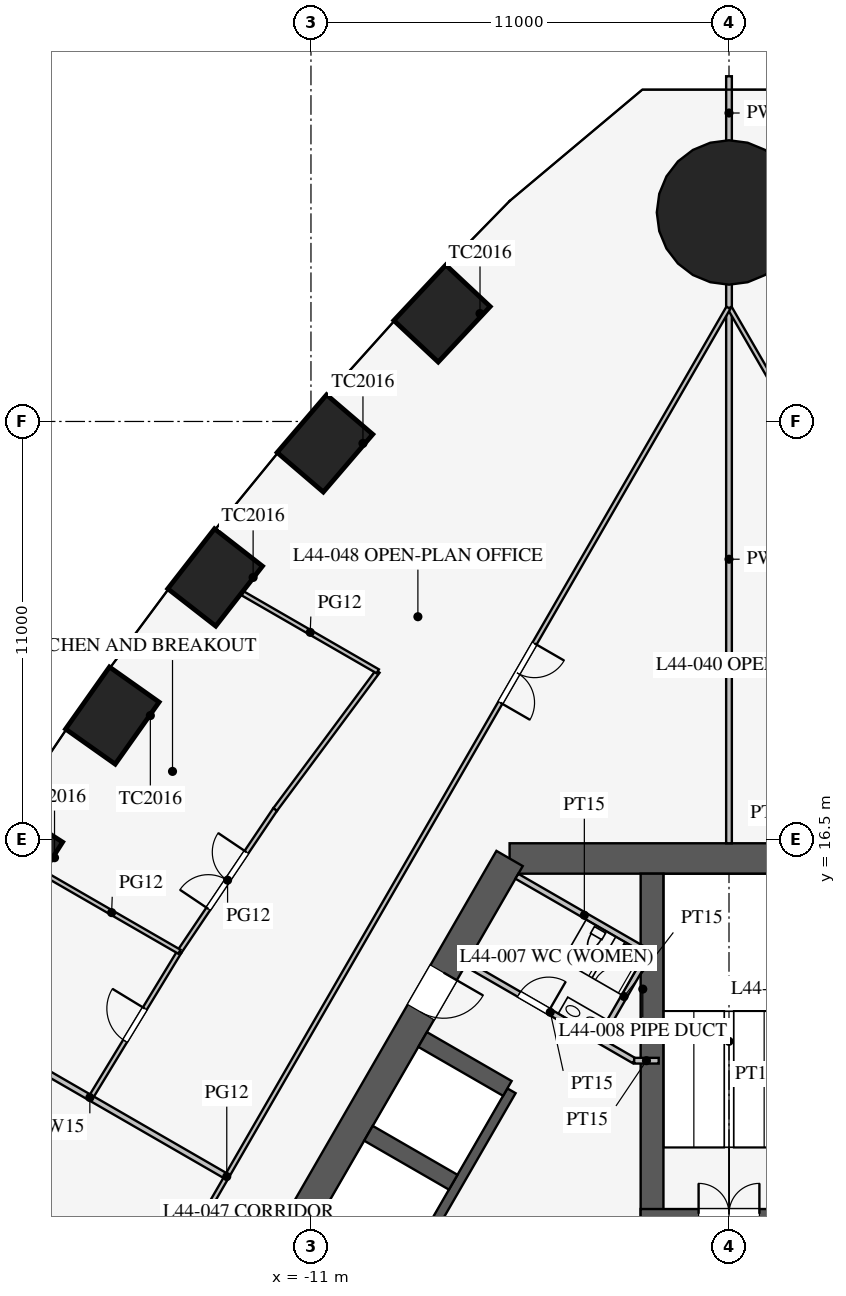
"""IFC4 building model, lengths in metres.
Left out: names, types, materials, properties, quantities, classifications, styles, units other than length and angle.
Written with IfcOpenShell. Run it as: python <this file> out.ifc"""

import sys

from ifc_helpers import new_model, si_unit, direction, frame, frame_2d, origin, origin_2d, place, context, subcontext, project, spatial, rectangle, circle, extrude, element, fill, save


model = new_model("IFC4")
c1 = context("Model", 3, precision=1e-05, world=origin(), true_north=direction((0.0, 1.0)))
c2 = subcontext(c1, "Body", "Model", "MODEL_VIEW")
j1 = project(units=[si_unit("LENGTHUNIT", "METRE"), si_unit("PLANEANGLEUNIT", "RADIAN")], contexts=[c1])
p1 = place(None, origin())
s1 = spatial("IfcSite", under=j1, at=p1, CompositionType="ELEMENT")
p2 = place(p1, origin())
s2 = spatial("IfcBuilding", under=s1, at=p2, CompositionType="ELEMENT")
p3 = place(p2, frame((0.0, 0.0, 193.9)))
s3 = spatial("IfcBuildingStorey", under=s2, at=p3, CompositionType="ELEMENT", Elevation=193.9)
for number, where, z_axis, x_axis in (
    (1, (-7.552, 30.341, 0.0), (0.0, 0.0, 1.0), (-0.684, -0.73, 0.0)),
    (2, (-10.632, 26.923, 0.0), (0.0, 0.0, 1.0), (-0.651, -0.759, 0.0)),
    (3, (-13.522, 23.396, 0.0), (0.0, 0.0, 1.0), (-0.615, -0.789, 0.0)),
    (4, (-16.227, 19.761, 0.0), (0.0, 0.0, 1.0), (-0.577, -0.816, 0.0)),
    (5, (-18.748, 16.02, 0.0), (0.0, 0.0, 1.0), (-0.539, -0.842, 0.0)),
):
    element("IfcColumn", number, at=place(p3, frame(where, z_axis=z_axis, x_axis=x_axis)), inside=s3, PredefinedType="COLUMN", context=c2, shape_type="SweptSolid", body=[
        extrude(rectangle(XDim=2.0, YDim=1.6, at=origin_2d()), origin(), (0.0, 0.0, 1.0), 4.2),
    ])
p4 = place(p3, frame((0.0, 33.0, 0.0), z_axis=(0.0, 0.0, 1.0), x_axis=(1.0, 0.0, 0.0)))
e6 = element("IfcColumn", 6, at=p4, inside=s3, PredefinedType="COLUMN", context=c2, shape_type="SweptSolid", body=[
    extrude(circle(Radius=1.9, at=origin_2d()), origin(), (0.0, 0.0, 1.0), 4.2),
])
p5 = place(p3, frame((5.773, 16.0, 0.0), z_axis=(0.0, 0.0, 1.0), x_axis=(-1.0, 0.0, 0.0)))
e7 = element("IfcWall", 7, at=p5, inside=s3, PredefinedType="SHEAR", context=c2, shape_type="SweptSolid", body=[
    extrude(rectangle(XDim=11.547, YDim=0.8, at=frame_2d((5.773, 0.0))), origin(), (0.0, 0.0, 1.0), 4.2),
])
p6 = place(p3, frame((-5.773, 16.0, 0.0), z_axis=(0.0, 0.0, 1.0), x_axis=(-0.500002442456, -0.866023993627, 0.0)))
e8 = element("IfcWall", 8, at=p6, inside=s3, PredefinedType="SHEAR", context=c2, shape_type="SweptSolid", body=[
    extrude(rectangle(XDim=21.939, YDim=0.8, at=frame_2d((10.97, 0.0))), origin(), (0.0, 0.0, 1.0), 4.2),
])
p7 = place(p6, frame((17.27, 0.0, 0.0)))
e9 = element("IfcOpeningElement", 9, at=p7, cuts=e8, PredefinedType="OPENING", context=c2, shape_type="SweptSolid", body=[
    extrude(rectangle(XDim=1.2, YDim=2.1, at=frame_2d((0.6, 1.05))), frame((0.0, 0.41, 0.0), z_axis=(0.0, -1.0, 0.0), x_axis=(1.0, 0.0, 0.0)), (0.0, 0.0, 1.0), 0.82),
])
p8 = place(p6, frame((3.47, 0.0, 0.0)))
e10 = element("IfcOpeningElement", 10, at=p8, cuts=e8, PredefinedType="OPENING", context=c2, shape_type="SweptSolid", body=[
    extrude(rectangle(XDim=1.2, YDim=2.1, at=frame_2d((0.6, 1.05))), frame((0.0, 0.41, 0.0), z_axis=(0.0, -1.0, 0.0), x_axis=(1.0, 0.0, 0.0)), (0.0, 0.0, 1.0), 0.82),
])
p9 = place(p3, frame((-5.724, 9.886, 0.0), z_axis=(0.0, 0.0, 1.0), x_axis=(-0.500001763848, -0.866024385424, 0.0)))
e11 = element("IfcWall", 11, at=p9, inside=s3, PredefinedType="SHEAR", context=c2, shape_type="SweptSolid", body=[
    extrude(rectangle(XDim=11.4, YDim=0.25, at=frame_2d((5.7, 0.0))), origin(), (0.0, 0.0, 1.0), 4.2),
])
p10 = place(p9, frame((6.525, 0.0, 0.0)))
e12 = element("IfcOpeningElement", 12, at=p10, cuts=e11, PredefinedType="OPENING", context=c2, shape_type="SweptSolid", body=[
    extrude(rectangle(XDim=1.2, YDim=2.2, at=frame_2d((0.6, 1.1))), frame((0.0, 0.135, 0.0), z_axis=(0.0, -1.0, 0.0), x_axis=(1.0, 0.0, 0.0)), (0.0, 0.0, 1.0), 0.27),
])
p11 = place(p9, frame((9.375, 0.0, 0.0)))
e13 = element("IfcOpeningElement", 13, at=p11, cuts=e11, PredefinedType="OPENING", context=c2, shape_type="SweptSolid", body=[
    extrude(rectangle(XDim=1.2, YDim=2.2, at=frame_2d((0.6, 1.1))), frame((0.0, 0.135, 0.0), z_axis=(0.0, -1.0, 0.0), x_axis=(1.0, 0.0, 0.0)), (0.0, 0.0, 1.0), 0.27),
])
p12 = place(p3, frame((-5.832, 9.949, 0.0), z_axis=(0.0, 0.0, 1.0), x_axis=(-0.866029291668, 0.499993265928, 0.0)))
e14 = element("IfcWall", 14, at=p12, inside=s3, PredefinedType="SHEAR", context=c2, shape_type="SweptSolid", body=[
    extrude(rectangle(XDim=2.575, YDim=0.45, at=frame_2d((1.288, 0.0))), origin(), (0.0, 0.0, 1.0), 4.2),
])
p13 = place(p3, frame((-7.257, 7.481, 0.0), z_axis=(0.0, 0.0, 1.0), x_axis=(-0.866046643894, 0.499963209246, 0.0)))
e15 = element("IfcWall", 15, at=p13, inside=s3, PredefinedType="SHEAR", context=c2, shape_type="SweptSolid", body=[
    extrude(rectangle(XDim=2.575, YDim=0.45, at=frame_2d((1.288, 0.0))), origin(), (0.0, 0.0, 1.0), 4.2),
])
p14 = place(p3, frame((-2.025, 6.525, 0.0), z_axis=(0.0, 0.0, 1.0), x_axis=(0.0, 1.0, 0.0)))
e16 = element("IfcWall", 16, at=p14, inside=s3, PredefinedType="SHEAR", context=c2, shape_type="SweptSolid", body=[
    extrude(rectangle(XDim=9.075, YDim=0.6, at=frame_2d((4.538, 0.0))), origin(), (0.0, 0.0, 1.0), 4.2),
])
p15 = place(p3, frame((2.325, 6.65, 0.0), z_axis=(0.0, 0.0, 1.0), x_axis=(-1.0, 0.0, 0.0)))
e17 = element("IfcWall", 17, at=p15, inside=s3, PredefinedType="SHEAR", context=c2, shape_type="SweptSolid", body=[
    extrude(rectangle(XDim=4.65, YDim=0.25, at=frame_2d((2.325, 0.0))), origin(), (0.0, 0.0, 1.0), 4.2),
])
p16 = place(p15, frame((1.525, 0.0, 0.0)))
e18 = element("IfcOpeningElement", 18, at=p16, cuts=e17, PredefinedType="OPENING", context=c2, shape_type="SweptSolid", body=[
    extrude(rectangle(XDim=1.6, YDim=2.1, at=frame_2d((0.8, 1.05))), frame((0.0, 0.135, 0.0), z_axis=(0.0, -1.0, 0.0), x_axis=(1.0, 0.0, 0.0)), (0.0, 0.0, 1.0), 0.27),
])
p17 = place(p3, frame((-2.495, 10.678, 0.0), z_axis=(0.0, 0.0, 1.0), x_axis=(-0.86602216432, 0.500005610874, 0.0)))
e19 = element("IfcWall", 19, at=p17, inside=s3, PredefinedType="PARTITIONING", context=c2, shape_type="SweptSolid", body=[
    extrude(rectangle(XDim=5.1, YDim=0.15, at=frame_2d((2.55, 0.0))), origin(), (0.0, 0.0, 1.0), 4.0),
])
p18 = place(p17, frame((2.6, 0.0, 0.0)))
e20 = element("IfcOpeningElement", 20, at=p18, cuts=e19, PredefinedType="OPENING", context=c2, shape_type="SweptSolid", body=[
    extrude(rectangle(XDim=0.9, YDim=2.1, at=frame_2d((0.45, 1.05))), frame((0.0, 0.085, 0.0), z_axis=(0.0, -1.0, 0.0), x_axis=(1.0, 0.0, 0.0)), (0.0, 0.0, 1.0), 0.17),
])
p19 = place(p3, frame((-2.495, 10.678, 0.0), z_axis=(0.0, 0.0, 1.0), x_axis=(1.0, 0.0, 0.0)))
e21 = element("IfcWall", 21, at=p19, inside=s3, PredefinedType="PARTITIONING", context=c2, shape_type="SweptSolid", body=[
    extrude(rectangle(XDim=0.645, YDim=0.15, at=frame_2d((0.323, 0.0))), origin(), (0.0, 0.0, 1.0), 4.0),
])
p20 = place(p3, frame((-2.031, 13.482, 0.0), z_axis=(0.0, 0.0, 1.0), x_axis=(-0.866050731258, 0.499956128963, 0.0)))
e22 = element("IfcWall", 22, at=p20, inside=s3, PredefinedType="PARTITIONING", context=c2, shape_type="SweptSolid", body=[
    extrude(rectangle(XDim=4.1, YDim=0.15, at=frame_2d((2.05, 0.0))), origin(), (0.0, 0.0, 1.0), 4.0),
])
p21 = place(p3, frame((-3.389, 11.281, 0.0), z_axis=(0.0, 0.0, 1.0), x_axis=(0.499989096993, 0.866031698547, 0.0)))
e23 = element("IfcWall", 23, at=p21, inside=s3, PredefinedType="PARTITIONING", context=c2, shape_type="SweptSolid", body=[
    extrude(rectangle(XDim=2.51, YDim=0.15, at=frame_2d((1.255, 0.0))), origin(), (0.0, 0.0, 1.0), 4.0),
])
p22 = place(p3, frame((0.0, 16.4, 0.0), z_axis=(0.0, 0.0, 1.0), x_axis=(0.0, 1.0, 0.0)))
e24 = element("IfcWall", 24, at=p22, inside=s3, PredefinedType="PARTITIONING", context=c2, shape_type="SweptSolid", body=[
    extrude(rectangle(XDim=14.95, YDim=0.15, at=frame_2d((7.475, 0.0))), origin(), (0.0, 0.0, 1.0), 2.4),
])
p23 = place(p3, frame((0.0, 34.65, 0.0), z_axis=(0.0, 0.0, 1.0), x_axis=(0.0, 1.0, 0.0)))
e25 = element("IfcWall", 25, at=p23, inside=s3, PredefinedType="PARTITIONING", context=c2, shape_type="SweptSolid", body=[
    extrude(rectangle(XDim=1.935, YDim=0.15, at=frame_2d((0.967, 0.0))), origin(), (0.0, 0.0, 1.0), 2.4),
])
p24 = place(p3, frame((26.415, -15.231, 0.0), z_axis=(0.0, 0.0, 1.0), x_axis=(-0.50000091641, 0.866024874695, 0.0)))
e26 = element("IfcWall", 26, at=p24, inside=s3, PredefinedType="PARTITIONING", context=c2, shape_type="SweptSolid", body=[
    extrude(rectangle(XDim=52.796, YDim=0.12, at=frame_2d((26.398, 0.0))), origin(), (0.0, 0.0, 1.0), 2.9),
])
p25 = place(p24, frame((10.2, 0.0, 0.15)))
e27 = element("IfcOpeningElement", 27, at=p25, cuts=e26, PredefinedType="OPENING", context=c2, shape_type="SweptSolid", body=[
    extrude(rectangle(XDim=1.8, YDim=2.1, at=frame_2d((0.9, 1.05))), frame((0.0, 0.07, 0.0), z_axis=(0.0, -1.0, 0.0), x_axis=(1.0, 0.0, 0.0)), (0.0, 0.0, 1.0), 0.14),
])
p26 = place(p24, frame((40.8, 0.0, 0.15)))
e28 = element("IfcOpeningElement", 28, at=p26, cuts=e26, PredefinedType="OPENING", context=c2, shape_type="SweptSolid", body=[
    extrude(rectangle(XDim=1.8, YDim=2.1, at=frame_2d((0.9, 1.05))), frame((0.0, 0.07, 0.0), z_axis=(0.0, -1.0, 0.0), x_axis=(1.0, 0.0, 0.0)), (0.0, 0.0, 1.0), 0.14),
])
p27 = place(p3, frame((-13.268, 7.66, 0.0), z_axis=(0.0, 0.0, 1.0), x_axis=(-0.866019499219, 0.500010226868, 0.0)))
e29 = element("IfcWall", 29, at=p27, inside=s3, PredefinedType="PARTITIONING", context=c2, shape_type="SweptSolid", body=[
    extrude(rectangle(XDim=8.2, YDim=0.15, at=frame_2d((4.1, 0.0))), origin(), (0.0, 0.0, 1.0), 2.992),
])
p28 = place(p3, frame((-0.016, 30.491, 0.0), z_axis=(0.0, 0.0, 1.0), x_axis=(-0.50000091641, -0.866024874695, 0.0)))
e30 = element("IfcWall", 30, at=p28, inside=s3, PredefinedType="PARTITIONING", context=c2, shape_type="SweptSolid", body=[
    extrude(rectangle(XDim=52.796, YDim=0.12, at=frame_2d((26.398, 0.0))), origin(), (0.0, 0.0, 1.0), 2.9),
])
p29 = place(p28, frame((10.2, 0.0, 0.15)))
e31 = element("IfcOpeningElement", 31, at=p29, cuts=e30, PredefinedType="OPENING", context=c2, shape_type="SweptSolid", body=[
    extrude(rectangle(XDim=1.8, YDim=2.1, at=frame_2d((0.9, 1.05))), frame((0.0, 0.07, 0.0), z_axis=(0.0, -1.0, 0.0), x_axis=(1.0, 0.0, 0.0)), (0.0, 0.0, 1.0), 0.14),
])
p30 = place(p28, frame((40.8, 0.0, 0.15)))
e32 = element("IfcOpeningElement", 32, at=p30, cuts=e30, PredefinedType="OPENING", context=c2, shape_type="SweptSolid", body=[
    extrude(rectangle(XDim=1.8, YDim=2.1, at=frame_2d((0.9, 1.05))), frame((0.0, 0.07, 0.0), z_axis=(0.0, -1.0, 0.0), x_axis=(1.0, 0.0, 0.0)), (0.0, 0.0, 1.0), 0.14),
])
p31 = place(p3, frame((-9.242, 20.924, 0.0), z_axis=(0.0, 0.0, 1.0), x_axis=(-0.59613842716, -0.802881669777, 0.0)))
e33 = element("IfcWall", 33, at=p31, inside=s3, PredefinedType="PARTITIONING", context=c2, shape_type="SweptSolid", body=[
    extrude(rectangle(XDim=4.53, YDim=0.12, at=frame_2d((2.265, 0.0))), origin(), (0.0, 0.0, 1.0), 2.9),
])
p32 = place(p3, frame((-14.462, 13.546, 0.0), z_axis=(0.0, 0.0, 1.0), x_axis=(-0.519790350351, -0.85429385558, 0.0)))
e34 = element("IfcWall", 34, at=p32, inside=s3, PredefinedType="PARTITIONING", context=c2, shape_type="SweptSolid", body=[
    extrude(rectangle(XDim=4.501, YDim=0.12, at=frame_2d((2.25, 0.0))), origin(), (0.0, 0.0, 1.0), 2.9),
])
p33 = place(p32, frame((1.75, 0.0, 0.15)))
e35 = element("IfcOpeningElement", 35, at=p33, cuts=e34, PredefinedType="OPENING", context=c2, shape_type="SweptSolid", body=[
    extrude(rectangle(XDim=1.0, YDim=2.1, at=frame_2d((0.5, 1.05))), frame((0.0, 0.07, 0.0), z_axis=(0.0, -1.0, 0.0), x_axis=(1.0, 0.0, 0.0)), (0.0, 0.0, 1.0), 0.14),
])
p34 = place(p3, frame((-11.943, 17.287, 0.0), z_axis=(0.0, 0.0, 1.0), x_axis=(-0.55850386778, -0.829501916619, 0.0)))
e36 = element("IfcWall", 36, at=p34, inside=s3, PredefinedType="PARTITIONING", context=c2, shape_type="SweptSolid", body=[
    extrude(rectangle(XDim=4.511, YDim=0.12, at=frame_2d((2.255, 0.0))), origin(), (0.0, 0.0, 1.0), 2.9),
])
p35 = place(p34, frame((1.35, 0.0, 0.15)))
e37 = element("IfcOpeningElement", 37, at=p35, cuts=e36, PredefinedType="OPENING", context=c2, shape_type="SweptSolid", body=[
    extrude(rectangle(XDim=1.8, YDim=2.1, at=frame_2d((0.9, 1.05))), frame((0.0, 0.07, 0.0), z_axis=(0.0, -1.0, 0.0), x_axis=(1.0, 0.0, 0.0)), (0.0, 0.0, 1.0), 0.14),
])
p36 = place(p3, frame((-9.242, 20.924, 0.0), z_axis=(0.0, 0.0, 1.0), x_axis=(-0.866016197294, 0.500015945769, 0.0)))
e38 = element("IfcWall", 38, at=p36, inside=s3, PredefinedType="PARTITIONING", context=c2, shape_type="SweptSolid", body=[
    extrude(rectangle(XDim=4.104, YDim=0.12, at=frame_2d((2.052, 0.0))), origin(), (0.0, 0.0, 1.0), 2.8),
])
p37 = place(p3, frame((-14.462, 13.546, 0.0), z_axis=(0.0, 0.0, 1.0), x_axis=(-0.865998005666, 0.50004745193, 0.0)))
e39 = element("IfcWall", 39, at=p37, inside=s3, PredefinedType="PARTITIONING", context=c2, shape_type="SweptSolid", body=[
    extrude(rectangle(XDim=4.118, YDim=0.12, at=frame_2d((2.059, 0.0))), origin(), (0.0, 0.0, 1.0), 2.9),
])
p38 = place(p18, frame((0.9, 0.0, 0.0), z_axis=(0.0, 0.0, 1.0), x_axis=(-1.0, 0.0, 0.0)))
e40 = element("IfcDoor", 40, at=p38, inside=s3, OperationType="SINGLE_SWING_RIGHT", PredefinedType="DOOR", context=c2, shape_type="SweptSolid", body=[
    extrude(rectangle(XDim=0.9, YDim=2.1, at=frame_2d((0.45, 1.05))), frame((0.0, 0.025, 0.0), z_axis=(0.0, -1.0, 0.0), x_axis=(1.0, 0.0, 0.0)), (0.0, 0.0, 1.0), 0.05),
])
fill(e20, e40)
p39 = place(p16, frame((1.6, 0.0, 0.0), z_axis=(0.0, 0.0, 1.0), x_axis=(-1.0, 0.0, 0.0)))
e41 = element("IfcDoor", 41, at=p39, inside=s3, OperationType="DOUBLE_DOOR_SINGLE_SWING", PredefinedType="DOOR", context=c2, shape_type="SweptSolid", body=[
    extrude(rectangle(XDim=1.6, YDim=2.1, at=frame_2d((0.8, 1.05))), frame((0.0, 0.025, 0.0), z_axis=(0.0, -1.0, 0.0), x_axis=(1.0, 0.0, 0.0)), (0.0, 0.0, 1.0), 0.05),
])
fill(e18, e41)
p40 = place(p8, origin())
e42 = element("IfcDoor", 42, at=p40, inside=s3, OperationType="SINGLE_SWING_LEFT", PredefinedType="DOOR", context=c2, shape_type="SweptSolid", body=[
    extrude(rectangle(XDim=1.2, YDim=2.1, at=frame_2d((0.6, 1.05))), frame((0.0, 0.025, 0.0), z_axis=(0.0, -1.0, 0.0), x_axis=(1.0, 0.0, 0.0)), (0.0, 0.0, 1.0), 0.05),
])
fill(e10, e42)
p41 = place(p35, frame((1.8, 0.0, 0.0), z_axis=(0.0, 0.0, 1.0), x_axis=(-1.0, 0.0, 0.0)))
e43 = element("IfcDoor", 43, at=p41, inside=s3, OperationType="DOUBLE_DOOR_SINGLE_SWING", PredefinedType="DOOR", context=c2, shape_type="SweptSolid", body=[
    extrude(rectangle(XDim=1.8, YDim=2.1, at=frame_2d((0.9, 1.05))), frame((0.0, 0.025, 0.0), z_axis=(0.0, -1.0, 0.0), x_axis=(1.0, 0.0, 0.0)), (0.0, 0.0, 1.0), 0.05),
])
fill(e37, e43)
p42 = place(p33, frame((1.0, 0.0, 0.0), z_axis=(0.0, 0.0, 1.0), x_axis=(-1.0, 0.0, 0.0)))
e44 = element("IfcDoor", 44, at=p42, inside=s3, OperationType="SINGLE_SWING_RIGHT", PredefinedType="DOOR", context=c2, shape_type="SweptSolid", body=[
    extrude(rectangle(XDim=1.0, YDim=2.1, at=frame_2d((0.5, 1.05))), frame((0.0, 0.025, 0.0), z_axis=(0.0, -1.0, 0.0), x_axis=(1.0, 0.0, 0.0)), (0.0, 0.0, 1.0), 0.05),
])
fill(e35, e44)
p43 = place(p29, origin())
e45 = element("IfcDoor", 45, at=p43, inside=s3, OperationType="DOUBLE_DOOR_SINGLE_SWING", PredefinedType="DOOR", context=c2, shape_type="SweptSolid", body=[
    extrude(rectangle(XDim=1.8, YDim=2.1, at=frame_2d((0.9, 1.05))), frame((0.0, 0.025, 0.0), z_axis=(0.0, -1.0, 0.0), x_axis=(1.0, 0.0, 0.0)), (0.0, 0.0, 1.0), 0.05),
])
fill(e31, e45)
save(model, sys.argv[1])
